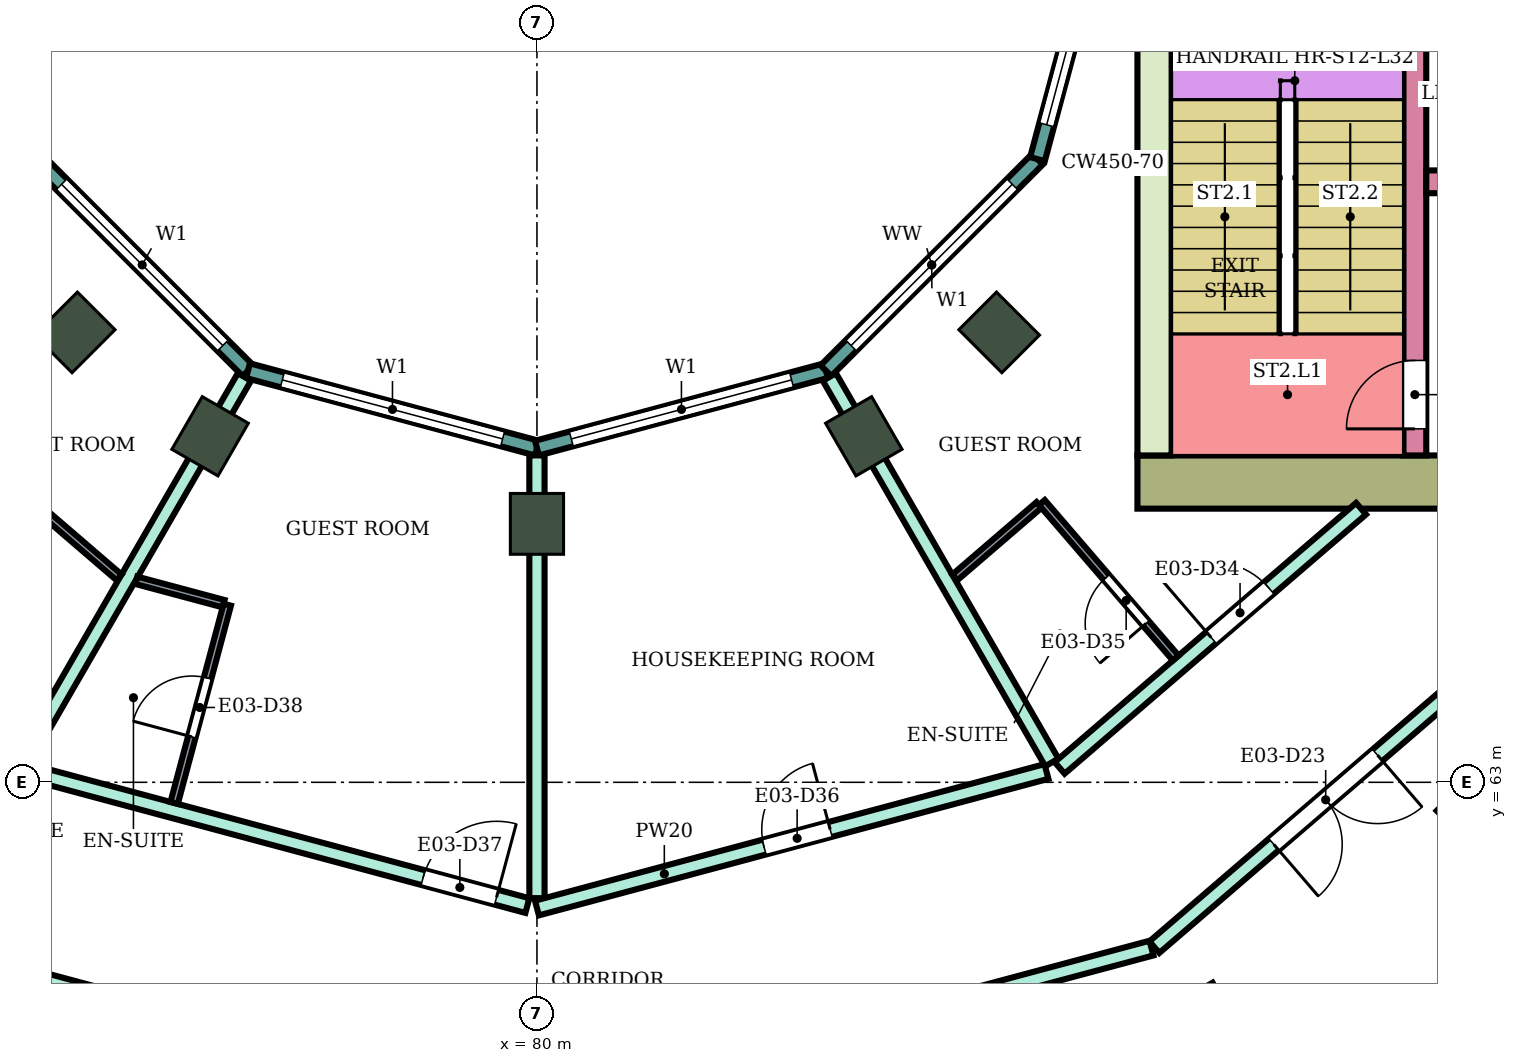
"""IFC4 building model, lengths in metres.
Left out: names, types, materials, properties, quantities, classifications, styles, units other than length and angle.
Written with IfcOpenShell. Run it as: python <this file> out.ifc"""

import sys

from ifc_helpers import new_model, si_unit, direction, frame, frame_2d, origin, origin_2d, place, context, subcontext, project, spatial, rectangle, extrude, element, fill, save


model = new_model("IFC4")
c1 = context("Model", 3, precision=1e-05, world=origin(), true_north=direction((0.0, 1.0)))
c2 = subcontext(c1, "Body", "Model", "MODEL_VIEW")
j1 = project(units=[si_unit("LENGTHUNIT", "METRE"), si_unit("PLANEANGLEUNIT", "RADIAN")], contexts=[c1])
p1 = place(None, origin())
s1 = spatial("IfcSite", under=j1, at=p1, CompositionType="ELEMENT")
p2 = place(p1, origin())
s2 = spatial("IfcBuilding", under=s1, at=p2, CompositionType="ELEMENT")
p3 = place(p2, frame((0.0, 0.0, 138.0)))
s3 = spatial("IfcBuildingStorey", under=s2, at=p3, CompositionType="ELEMENT", Elevation=138.0)
for number, where, z_axis, x_axis in (
    (1, (88.8, 59.758, 0.0), (0.0, 0.0, 1.0), (0.5, -0.866, 0.0)),
    (2, (92.445, 62.555, 0.0), (0.0, 0.0, 1.0), (0.707, -0.707, 0.0)),
):
    element("IfcColumn", number, at=place(p3, frame(where, z_axis=z_axis, x_axis=x_axis)), inside=s3, PredefinedType="COLUMN", context=c2, shape_type="SweptSolid", body=[
        extrude(rectangle(XDim=1.0, YDim=0.8, at=origin_2d()), origin(), (0.0, 0.0, 1.0), 3.9),
    ])
for number, where, z_axis, x_axis in (
    (3, (73.919, 68.919, 0.0), (0.0, 0.0, 1.0), (-0.707, -0.707, 0.0)),
    (4, (75.7, 67.552, 0.0), (0.0, 0.0, 1.0), (-0.5, -0.866, 0.0)),
    (5, (80.0, 66.4, 0.0), (0.0, 0.0, 1.0), (0.0, -1.0, 0.0)),
    (6, (84.3, 67.552, 0.0), (0.0, 0.0, 1.0), (0.5, -0.866, 0.0)),
    (7, (86.081, 68.919, 0.0), (0.0, 0.0, 1.0), (0.707, -0.707, 0.0)),
):
    element("IfcColumn", number, at=place(p3, frame(where, z_axis=z_axis, x_axis=x_axis)), inside=s3, PredefinedType="COLUMN", context=c2, shape_type="SweptSolid", body=[
        extrude(rectangle(XDim=0.8, YDim=0.7, at=origin_2d()), origin(), (0.0, 0.0, 1.0), 3.9),
    ])
p4 = place(p3, frame((87.9, 66.95, 0.0), z_axis=(0.0, 0.0, 1.0), x_axis=(1.0, 0.0, 0.0)))
e8 = element("IfcWall", 8, at=p4, inside=s3, PredefinedType="SHEAR", context=c2, shape_type="SweptSolid", body=[
    extrude(rectangle(XDim=14.8, YDim=0.7, at=frame_2d((7.4, 0.0))), origin(), (0.0, 0.0, 1.0), 3.58),
])
p5 = place(p4, frame((4.2, 0.0, 0.0)))
e9 = element("IfcOpeningElement", 9, at=p5, cuts=e8, PredefinedType="OPENING", context=c2, shape_type="SweptSolid", body=[
    extrude(rectangle(XDim=2.4, YDim=2.4, at=frame_2d((1.2, 1.2))), frame((0.0, 0.36, 0.0), z_axis=(0.0, -1.0, 0.0), x_axis=(1.0, 0.0, 0.0)), (0.0, 0.0, 1.0), 0.72),
])
p6 = place(p3, frame((88.125, 67.3, 0.0), z_axis=(0.0, 0.0, 1.0), x_axis=(0.0, 1.0, 0.0)))
e10 = element("IfcWall", 10, at=p6, inside=s3, PredefinedType="SHEAR", context=c2, shape_type="SweptSolid", body=[
    extrude(rectangle(XDim=7.7, YDim=0.45, at=frame_2d((3.85, 0.0))), origin(), (0.0, 0.0, 1.0), 3.58),
])
p7 = place(p3, frame((91.55, 67.3, 0.0), z_axis=(0.0, 0.0, 1.0), x_axis=(0.0, 1.0, 0.0)))
e11 = element("IfcWall", 11, at=p7, inside=s3, PredefinedType="SHEAR", context=c2, shape_type="SweptSolid", body=[
    extrude(rectangle(XDim=7.7, YDim=0.3, at=frame_2d((3.85, 0.0))), origin(), (0.0, 0.0, 1.0), 3.58),
])
p8 = place(p7, frame((0.35, 0.0, 0.0)))
e12 = element("IfcOpeningElement", 12, at=p8, cuts=e11, PredefinedType="OPENING", context=c2, shape_type="SweptSolid", body=[
    extrude(rectangle(XDim=0.9, YDim=2.1, at=frame_2d((0.45, 1.05))), frame((0.0, 0.16, 0.0), z_axis=(0.0, -1.0, 0.0), x_axis=(1.0, 0.0, 0.0)), (0.0, 0.0, 1.0), 0.32),
])
p9 = place(p3, frame((91.7, 70.9, 0.0), z_axis=(0.0, 0.0, 1.0), x_axis=(1.0, 0.0, 0.0)))
e13 = element("IfcWall", 13, at=p9, inside=s3, PredefinedType="SHEAR", context=c2, shape_type="SweptSolid", body=[
    extrude(rectangle(XDim=11.0, YDim=0.3, at=frame_2d((5.5, 0.0))), origin(), (0.0, 0.0, 1.0), 3.58),
])
p10 = place(p9, frame((0.4, 0.0, 0.0)))
e14 = element("IfcOpeningElement", 14, at=p10, cuts=e13, PredefinedType="OPENING", context=c2, shape_type="SweptSolid", body=[
    extrude(rectangle(XDim=1.4, YDim=2.1, at=frame_2d((0.7, 1.05))), frame((0.0, 0.16, 0.0), z_axis=(0.0, -1.0, 0.0), x_axis=(1.0, 0.0, 0.0)), (0.0, 0.0, 1.0), 0.32),
])
p11 = place(p9, frame((5.4, 0.0, 0.0)))
e15 = element("IfcOpeningElement", 15, at=p11, cuts=e13, PredefinedType="OPENING", context=c2, shape_type="SweptSolid", body=[
    extrude(rectangle(XDim=1.4, YDim=2.1, at=frame_2d((0.7, 1.05))), frame((0.0, 0.16, 0.0), z_axis=(0.0, -1.0, 0.0), x_axis=(1.0, 0.0, 0.0)), (0.0, 0.0, 1.0), 0.32),
])
p12 = place(p9, frame((8.1, 0.0, 0.0)))
e16 = element("IfcOpeningElement", 16, at=p12, cuts=e13, PredefinedType="OPENING", context=c2, shape_type="SweptSolid", body=[
    extrude(rectangle(XDim=1.0, YDim=2.1, at=frame_2d((0.5, 1.05))), frame((0.0, 0.16, 0.0), z_axis=(0.0, -1.0, 0.0), x_axis=(1.0, 0.0, 0.0)), (0.0, 0.0, 1.0), 0.32),
])
p13 = place(p3, frame((73.415, 71.198, 0.0), z_axis=(0.0, 0.0, 1.0), x_axis=(0.707106781187, -0.707106781187, 0.0)))
e17 = element("IfcWall", 17, at=p13, inside=s3, PredefinedType="NOTDEFINED", context=c2, shape_type="SweptSolid", body=[
    extrude(rectangle(XDim=3.936, YDim=0.2, at=frame_2d((1.968, 0.0))), origin(), (0.0, 0.0, 1.0), 3.9),
])
p14 = place(p13, frame((0.468, 0.0, 0.9)))
e18 = element("IfcOpeningElement", 18, at=p14, cuts=e17, PredefinedType="OPENING", context=c2, shape_type="SweptSolid", body=[
    extrude(rectangle(XDim=3.0, YDim=2.3, at=frame_2d((1.5, 1.15))), frame((0.0, 0.11, 0.0), z_axis=(0.0, -1.0, 0.0), x_axis=(1.0, 0.0, 0.0)), (0.0, 0.0, 1.0), 0.22),
])
p15 = place(p3, frame((76.198, 68.415, 0.0), z_axis=(0.0, 0.0, 1.0), x_axis=(0.965933654434, -0.258789828301, 0.0)))
e19 = element("IfcWall", 19, at=p15, inside=s3, PredefinedType="NOTDEFINED", context=c2, shape_type="SweptSolid", body=[
    extrude(rectangle(XDim=3.936, YDim=0.2, at=frame_2d((1.968, 0.0))), origin(), (0.0, 0.0, 1.0), 3.9),
])
p16 = place(p15, frame((0.468, 0.0, 0.9)))
e20 = element("IfcOpeningElement", 20, at=p16, cuts=e19, PredefinedType="OPENING", context=c2, shape_type="SweptSolid", body=[
    extrude(rectangle(XDim=3.0, YDim=2.3, at=frame_2d((1.5, 1.15))), frame((0.0, 0.11, 0.0), z_axis=(0.0, -1.0, 0.0), x_axis=(1.0, 0.0, 0.0)), (0.0, 0.0, 1.0), 0.22),
])
p17 = place(p3, frame((80.0, 67.396, 0.0), z_axis=(0.0, 0.0, 1.0), x_axis=(0.965933654434, 0.258789828301, 0.0)))
e21 = element("IfcWall", 21, at=p17, inside=s3, PredefinedType="NOTDEFINED", context=c2, shape_type="SweptSolid", body=[
    extrude(rectangle(XDim=3.936, YDim=0.2, at=frame_2d((1.968, 0.0))), origin(), (0.0, 0.0, 1.0), 3.9),
])
p18 = place(p17, frame((0.468, 0.0, 0.9)))
e22 = element("IfcOpeningElement", 22, at=p18, cuts=e21, PredefinedType="OPENING", context=c2, shape_type="SweptSolid", body=[
    extrude(rectangle(XDim=3.0, YDim=2.3, at=frame_2d((1.5, 1.15))), frame((0.0, 0.11, 0.0), z_axis=(0.0, -1.0, 0.0), x_axis=(1.0, 0.0, 0.0)), (0.0, 0.0, 1.0), 0.22),
])
p19 = place(p3, frame((83.802, 68.415, 0.0), z_axis=(0.0, 0.0, 1.0), x_axis=(0.707106781187, 0.707106781187, 0.0)))
e23 = element("IfcWall", 23, at=p19, inside=s3, PredefinedType="NOTDEFINED", context=c2, shape_type="SweptSolid", body=[
    extrude(rectangle(XDim=3.936, YDim=0.2, at=frame_2d((1.968, 0.0))), origin(), (0.0, 0.0, 1.0), 3.9),
])
p20 = place(p19, frame((0.468, 0.0, 0.9)))
e24 = element("IfcOpeningElement", 24, at=p20, cuts=e23, PredefinedType="OPENING", context=c2, shape_type="SweptSolid", body=[
    extrude(rectangle(XDim=3.0, YDim=2.3, at=frame_2d((1.5, 1.15))), frame((0.0, 0.11, 0.0), z_axis=(0.0, -1.0, 0.0), x_axis=(1.0, 0.0, 0.0)), (0.0, 0.0, 1.0), 0.22),
])
p21 = place(p3, frame((86.585, 71.198, 0.0), z_axis=(0.0, 0.0, 1.0), x_axis=(0.258789828301, 0.965933654434, 0.0)))
e25 = element("IfcWall", 25, at=p21, inside=s3, PredefinedType="NOTDEFINED", context=c2, shape_type="SweptSolid", body=[
    extrude(rectangle(XDim=3.936, YDim=0.2, at=frame_2d((1.968, 0.0))), origin(), (0.0, 0.0, 1.0), 3.9),
])
p22 = place(p21, frame((0.468, 0.0, 0.9)))
e26 = element("IfcOpeningElement", 26, at=p22, cuts=e25, PredefinedType="OPENING", context=c2, shape_type="SweptSolid", body=[
    extrude(rectangle(XDim=3.0, YDim=2.3, at=frame_2d((1.5, 1.15))), frame((0.0, 0.11, 0.0), z_axis=(0.0, -1.0, 0.0), x_axis=(1.0, 0.0, 0.0)), (0.0, 0.0, 1.0), 0.22),
])
p23 = place(p3, frame((71.877, 60.832, 0.0), z_axis=(0.0, 0.0, 1.0), x_axis=(0.965852509869, -0.259092510851, 0.0)))
e27 = element("IfcWall", 27, at=p23, inside=s3, PredefinedType="PARTITIONING", context=c2, shape_type="SweptSolid", body=[
    extrude(rectangle(XDim=8.32, YDim=0.2, at=frame_2d((4.16, 0.0))), origin(), (0.0, 0.0, 1.0), 3.45),
])
p24 = place(p23, frame((6.86, 0.0, 0.0)))
e28 = element("IfcOpeningElement", 28, at=p24, cuts=e27, PredefinedType="OPENING", context=c2, shape_type="SweptSolid", body=[
    extrude(rectangle(XDim=1.0, YDim=2.1, at=frame_2d((0.5, 1.05))), frame((0.0, 0.11, 0.0), z_axis=(0.0, -1.0, 0.0), x_axis=(1.0, 0.0, 0.0)), (0.0, 0.0, 1.0), 0.22),
])
p25 = place(p23, frame((0.55, 0.0, 0.0)))
e29 = element("IfcOpeningElement", 29, at=p25, cuts=e27, PredefinedType="OPENING", context=c2, shape_type="SweptSolid", body=[
    extrude(rectangle(XDim=1.0, YDim=2.1, at=frame_2d((0.5, 1.05))), frame((0.0, 0.11, 0.0), z_axis=(0.0, -1.0, 0.0), x_axis=(1.0, 0.0, 0.0)), (0.0, 0.0, 1.0), 0.22),
])
p26 = place(p3, frame((73.297, 63.143, 0.0), z_axis=(0.0, 0.0, 1.0), x_axis=(0.965859030528, -0.25906820173, 0.0)))
e30 = element("IfcWall", 30, at=p26, inside=s3, PredefinedType="PARTITIONING", context=c2, shape_type="SweptSolid", body=[
    extrude(rectangle(XDim=6.81, YDim=0.2, at=frame_2d((3.405, 0.0))), origin(), (0.0, 0.0, 1.0), 3.45),
])
p27 = place(p26, frame((5.39, 0.0, 0.0)))
e31 = element("IfcOpeningElement", 31, at=p27, cuts=e30, PredefinedType="OPENING", context=c2, shape_type="SweptSolid", body=[
    extrude(rectangle(XDim=1.0, YDim=2.1, at=frame_2d((0.5, 1.05))), frame((0.0, 0.11, 0.0), z_axis=(0.0, -1.0, 0.0), x_axis=(1.0, 0.0, 0.0)), (0.0, 0.0, 1.0), 0.22),
])
p28 = place(p3, frame((73.173, 63.176, 0.0), z_axis=(0.0, 0.0, 1.0), x_axis=(0.500239348149, 0.865887171959, 0.0)))
e32 = element("IfcWall", 32, at=p28, inside=s3, PredefinedType="PARTITIONING", context=c2, shape_type="SweptSolid", body=[
    extrude(rectangle(XDim=5.955, YDim=0.2, at=frame_2d((2.978, 0.0))), origin(), (0.0, 0.0, 1.0), 3.45),
])
p29 = place(p3, frame((80.0, 58.654, 0.0), z_axis=(0.0, 0.0, 1.0), x_axis=(0.965979808777, 0.25861749561, 0.0)))
e33 = element("IfcWall", 33, at=p29, inside=s3, PredefinedType="PARTITIONING", context=c2, shape_type="SweptSolid", body=[
    extrude(rectangle(XDim=8.37, YDim=0.2, at=frame_2d((4.185, 0.0))), origin(), (0.0, 0.0, 1.0), 3.45),
])
p30 = place(p29, frame((0.55, 0.0, 0.0)))
e34 = element("IfcOpeningElement", 34, at=p30, cuts=e33, PredefinedType="OPENING", context=c2, shape_type="SweptSolid", body=[
    extrude(rectangle(XDim=1.0, YDim=2.1, at=frame_2d((0.5, 1.05))), frame((0.0, 0.11, 0.0), z_axis=(0.0, -1.0, 0.0), x_axis=(1.0, 0.0, 0.0)), (0.0, 0.0, 1.0), 0.22),
])
p31 = place(p3, frame((80.0, 61.476, 0.0), z_axis=(0.0, 0.0, 1.0), x_axis=(0.0, 1.0, 0.0)))
e35 = element("IfcWall", 35, at=p31, inside=s3, PredefinedType="PARTITIONING", context=c2, shape_type="SweptSolid", body=[
    extrude(rectangle(XDim=5.825, YDim=0.2, at=frame_2d((2.913, 0.0))), origin(), (0.0, 0.0, 1.0), 3.45),
])
p32 = place(p3, frame((80.0, 61.346, 0.0), z_axis=(0.0, 0.0, 1.0), x_axis=(0.965915385935, 0.25885800589, 0.0)))
e36 = element("IfcWall", 36, at=p32, inside=s3, PredefinedType="PARTITIONING", context=c2, shape_type="SweptSolid", body=[
    extrude(rectangle(XDim=6.94, YDim=0.2, at=frame_2d((3.47, 0.0))), origin(), (0.0, 0.0, 1.0), 3.45),
])
p33 = place(p32, frame((3.094, 0.0, 0.0)))
e37 = element("IfcOpeningElement", 37, at=p33, cuts=e36, PredefinedType="OPENING", context=c2, shape_type="SweptSolid", body=[
    extrude(rectangle(XDim=0.9, YDim=2.1, at=frame_2d((0.45, 1.05))), frame((0.0, 0.11, 0.0), z_axis=(0.0, -1.0, 0.0), x_axis=(1.0, 0.0, 0.0)), (0.0, 0.0, 1.0), 0.22),
])
p34 = place(p3, frame((83.847, 68.332, 0.0), z_axis=(0.0, 0.0, 1.0), x_axis=(0.499901724708, -0.866082135617, 0.0)))
e38 = element("IfcWall", 38, at=p34, inside=s3, PredefinedType="PARTITIONING", context=c2, shape_type="SweptSolid", body=[
    extrude(rectangle(XDim=5.855, YDim=0.2, at=frame_2d((2.928, 0.0))), origin(), (0.0, 0.0, 1.0), 3.45),
])
p35 = place(p3, frame((86.877, 63.189, 0.0), z_axis=(0.0, 0.0, 1.0), x_axis=(0.758164888471, 0.652062881853, 0.0)))
e39 = element("IfcWall", 39, at=p35, inside=s3, PredefinedType="PARTITIONING", context=c2, shape_type="SweptSolid", body=[
    extrude(rectangle(XDim=5.23, YDim=0.2, at=frame_2d((2.615, 0.0))), origin(), (0.0, 0.0, 1.0), 3.45),
])
p36 = place(p35, frame((2.63, 0.0, 0.0)))
e40 = element("IfcOpeningElement", 40, at=p36, cuts=e39, PredefinedType="OPENING", context=c2, shape_type="SweptSolid", body=[
    extrude(rectangle(XDim=1.0, YDim=2.1, at=frame_2d((0.5, 1.05))), frame((0.0, 0.11, 0.0), z_axis=(0.0, -1.0, 0.0), x_axis=(1.0, 0.0, 0.0)), (0.0, 0.0, 1.0), 0.22),
])
p37 = place(p3, frame((88.123, 60.831, 0.0), z_axis=(0.0, 0.0, 1.0), x_axis=(0.758118199374, 0.652117164149, 0.0)))
e41 = element("IfcWall", 41, at=p37, inside=s3, PredefinedType="PARTITIONING", context=c2, shape_type="SweptSolid", body=[
    extrude(rectangle(XDim=6.486, YDim=0.2, at=frame_2d((3.243, 0.0))), origin(), (0.0, 0.0, 1.0), 3.45),
])
p38 = place(p37, frame((2.073, 0.0, 0.0)))
e42 = element("IfcOpeningElement", 42, at=p38, cuts=e41, PredefinedType="OPENING", context=c2, shape_type="SweptSolid", body=[
    extrude(rectangle(XDim=1.8, YDim=2.1, at=frame_2d((0.9, 1.05))), frame((0.0, 0.11, 0.0), z_axis=(0.0, -1.0, 0.0), x_axis=(1.0, 0.0, 0.0)), (0.0, 0.0, 1.0), 0.22),
])
p39 = place(p3, frame((73.357, 66.681, 0.0), z_axis=(0.0, 0.0, 1.0), x_axis=(0.758263469747, -0.651948242154, 0.0)))
e43 = element("IfcWall", 43, at=p39, inside=s3, PredefinedType="PARTITIONING", context=c2, shape_type="SweptSolid", body=[
    extrude(rectangle(XDim=1.511, YDim=0.1, at=frame_2d((0.755, 0.0))), origin(), (0.0, 0.0, 1.0), 3.45),
])
p40 = place(p3, frame((74.729, 65.657, 0.0), z_axis=(0.0, 0.0, 1.0), x_axis=(0.965948051503, -0.258736085224, 0.0)))
e44 = element("IfcWall", 44, at=p40, inside=s3, PredefinedType="PARTITIONING", context=c2, shape_type="SweptSolid", body=[
    extrude(rectangle(XDim=1.189, YDim=0.1, at=frame_2d((0.594, 0.0))), origin(), (0.0, 0.0, 1.0), 3.45),
])
p41 = place(p3, frame((75.227, 62.729, 0.0), z_axis=(0.0, 0.0, 1.0), x_axis=(0.258945475746, 0.965891940432, 0.0)))
e45 = element("IfcWall", 45, at=p41, inside=s3, PredefinedType="PARTITIONING", context=c2, shape_type="SweptSolid", body=[
    extrude(rectangle(XDim=2.7, YDim=0.1, at=frame_2d((1.35, 0.0))), origin(), (0.0, 0.0, 1.0), 3.45),
])
p42 = place(p41, frame((0.9, 0.0, 0.0)))
e46 = element("IfcOpeningElement", 46, at=p42, cuts=e45, PredefinedType="OPENING", context=c2, shape_type="SweptSolid", body=[
    extrude(rectangle(XDim=0.8, YDim=2.1, at=frame_2d((0.4, 1.05))), frame((0.0, 0.06, 0.0), z_axis=(0.0, -1.0, 0.0), x_axis=(1.0, 0.0, 0.0)), (0.0, 0.0, 1.0), 0.12),
])
p43 = place(p3, frame((85.497, 65.696, 0.0), z_axis=(0.0, 0.0, 1.0), x_axis=(0.75817032582, 0.652056559698, 0.0)))
e47 = element("IfcWall", 47, at=p43, inside=s3, PredefinedType="PARTITIONING", context=c2, shape_type="SweptSolid", body=[
    extrude(rectangle(XDim=1.461, YDim=0.1, at=frame_2d((0.73, 0.0))), origin(), (0.0, 0.0, 1.0), 3.45),
])
p44 = place(p3, frame((86.643, 66.681, 0.0), z_axis=(0.0, 0.0, 1.0), x_axis=(0.652264876065, -0.757991115682, 0.0)))
e48 = element("IfcWall", 48, at=p44, inside=s3, PredefinedType="PARTITIONING", context=c2, shape_type="SweptSolid", body=[
    extrude(rectangle(XDim=2.699, YDim=0.1, at=frame_2d((1.35, 0.0))), origin(), (0.0, 0.0, 1.0), 3.45),
])
p45 = place(p44, frame((1.3, 0.0, 0.0)))
e49 = element("IfcOpeningElement", 49, at=p45, cuts=e48, PredefinedType="OPENING", context=c2, shape_type="SweptSolid", body=[
    extrude(rectangle(XDim=0.8, YDim=2.1, at=frame_2d((0.4, 1.05))), frame((0.0, 0.06, 0.0), z_axis=(0.0, -1.0, 0.0), x_axis=(1.0, 0.0, 0.0)), (0.0, 0.0, 1.0), 0.12),
])
p46 = place(p14, origin())
e50 = element("IfcWindow", 50, at=p46, inside=s3, PartitioningType="SINGLE_PANEL", PredefinedType="WINDOW", context=c2, shape_type="SweptSolid", body=[
    extrude(rectangle(XDim=3.0, YDim=2.3, at=frame_2d((1.5, 1.15))), frame((0.0, 0.03, 0.0), z_axis=(0.0, -1.0, 0.0), x_axis=(1.0, 0.0, 0.0)), (0.0, 0.0, 1.0), 0.06),
])
fill(e18, e50)
p47 = place(p16, origin())
e51 = element("IfcWindow", 51, at=p47, inside=s3, PartitioningType="SINGLE_PANEL", PredefinedType="WINDOW", context=c2, shape_type="SweptSolid", body=[
    extrude(rectangle(XDim=3.0, YDim=2.3, at=frame_2d((1.5, 1.15))), frame((0.0, 0.03, 0.0), z_axis=(0.0, -1.0, 0.0), x_axis=(1.0, 0.0, 0.0)), (0.0, 0.0, 1.0), 0.06),
])
fill(e20, e51)
p48 = place(p18, origin())
e52 = element("IfcWindow", 52, at=p48, inside=s3, PartitioningType="SINGLE_PANEL", PredefinedType="WINDOW", context=c2, shape_type="SweptSolid", body=[
    extrude(rectangle(XDim=3.0, YDim=2.3, at=frame_2d((1.5, 1.15))), frame((0.0, 0.03, 0.0), z_axis=(0.0, -1.0, 0.0), x_axis=(1.0, 0.0, 0.0)), (0.0, 0.0, 1.0), 0.06),
])
fill(e22, e52)
p49 = place(p20, origin())
e53 = element("IfcWindow", 53, at=p49, inside=s3, PartitioningType="SINGLE_PANEL", PredefinedType="WINDOW", context=c2, shape_type="SweptSolid", body=[
    extrude(rectangle(XDim=3.0, YDim=2.3, at=frame_2d((1.5, 1.15))), frame((0.0, 0.03, 0.0), z_axis=(0.0, -1.0, 0.0), x_axis=(1.0, 0.0, 0.0)), (0.0, 0.0, 1.0), 0.06),
])
fill(e24, e53)
p50 = place(p22, origin())
e54 = element("IfcWindow", 54, at=p50, inside=s3, PartitioningType="SINGLE_PANEL", PredefinedType="WINDOW", context=c2, shape_type="SweptSolid", body=[
    extrude(rectangle(XDim=3.0, YDim=2.3, at=frame_2d((1.5, 1.15))), frame((0.0, 0.03, 0.0), z_axis=(0.0, -1.0, 0.0), x_axis=(1.0, 0.0, 0.0)), (0.0, 0.0, 1.0), 0.06),
])
fill(e26, e54)
p51 = place(p38, frame((1.8, 0.0, 0.0), z_axis=(0.0, 0.0, 1.0), x_axis=(-1.0, 0.0, 0.0)))
e55 = element("IfcDoor", 55, at=p51, inside=s3, OperationType="DOUBLE_DOOR_SINGLE_SWING", PredefinedType="DOOR", context=c2, shape_type="SweptSolid", body=[
    extrude(rectangle(XDim=1.8, YDim=2.1, at=frame_2d((0.9, 1.05))), frame((0.0, 0.025, 0.0), z_axis=(0.0, -1.0, 0.0), x_axis=(1.0, 0.0, 0.0)), (0.0, 0.0, 1.0), 0.05),
])
fill(e42, e55)
p52 = place(p36, origin())
e56 = element("IfcDoor", 56, at=p52, inside=s3, OperationType="SINGLE_SWING_LEFT", PredefinedType="DOOR", context=c2, shape_type="SweptSolid", body=[
    extrude(rectangle(XDim=1.0, YDim=2.1, at=frame_2d((0.5, 1.05))), frame((0.0, 0.025, 0.0), z_axis=(0.0, -1.0, 0.0), x_axis=(1.0, 0.0, 0.0)), (0.0, 0.0, 1.0), 0.05),
])
fill(e40, e56)
p53 = place(p45, frame((0.8, 0.0, 0.0), z_axis=(0.0, 0.0, 1.0), x_axis=(-1.0, 0.0, 0.0)))
e57 = element("IfcDoor", 57, at=p53, inside=s3, OperationType="SINGLE_SWING_LEFT", PredefinedType="DOOR", context=c2, shape_type="SweptSolid", body=[
    extrude(rectangle(XDim=0.8, YDim=2.1, at=frame_2d((0.4, 1.05))), frame((0.0, 0.025, 0.0), z_axis=(0.0, -1.0, 0.0), x_axis=(1.0, 0.0, 0.0)), (0.0, 0.0, 1.0), 0.05),
])
fill(e49, e57)
p54 = place(p33, origin())
e58 = element("IfcDoor", 58, at=p54, inside=s3, OperationType="SINGLE_SWING_RIGHT", PredefinedType="DOOR", context=c2, shape_type="SweptSolid", body=[
    extrude(rectangle(XDim=0.9, YDim=2.1, at=frame_2d((0.45, 1.05))), frame((0.0, 0.025, 0.0), z_axis=(0.0, -1.0, 0.0), x_axis=(1.0, 0.0, 0.0)), (0.0, 0.0, 1.0), 0.05),
])
fill(e37, e58)
p55 = place(p27, origin())
e59 = element("IfcDoor", 59, at=p55, inside=s3, OperationType="SINGLE_SWING_RIGHT", PredefinedType="DOOR", context=c2, shape_type="SweptSolid", body=[
    extrude(rectangle(XDim=1.0, YDim=2.1, at=frame_2d((0.5, 1.05))), frame((0.0, 0.025, 0.0), z_axis=(0.0, -1.0, 0.0), x_axis=(1.0, 0.0, 0.0)), (0.0, 0.0, 1.0), 0.05),
])
fill(e31, e59)
p56 = place(p42, origin())
e60 = element("IfcDoor", 60, at=p56, inside=s3, OperationType="SINGLE_SWING_LEFT", PredefinedType="DOOR", context=c2, shape_type="SweptSolid", body=[
    extrude(rectangle(XDim=0.8, YDim=2.1, at=frame_2d((0.4, 1.05))), frame((0.0, 0.025, 0.0), z_axis=(0.0, -1.0, 0.0), x_axis=(1.0, 0.0, 0.0)), (0.0, 0.0, 1.0), 0.05),
])
fill(e46, e60)
p57 = place(p8, origin())
e61 = element("IfcDoor", 61, at=p57, inside=s3, OperationType="SINGLE_SWING_LEFT", PredefinedType="DOOR", context=c2, shape_type="SweptSolid", body=[
    extrude(rectangle(XDim=0.9, YDim=2.1, at=frame_2d((0.45, 1.05))), frame((0.0, 0.025, 0.0), z_axis=(0.0, -1.0, 0.0), x_axis=(1.0, 0.0, 0.0)), (0.0, 0.0, 1.0), 0.05),
])
fill(e12, e61)
save(model, sys.argv[1])
